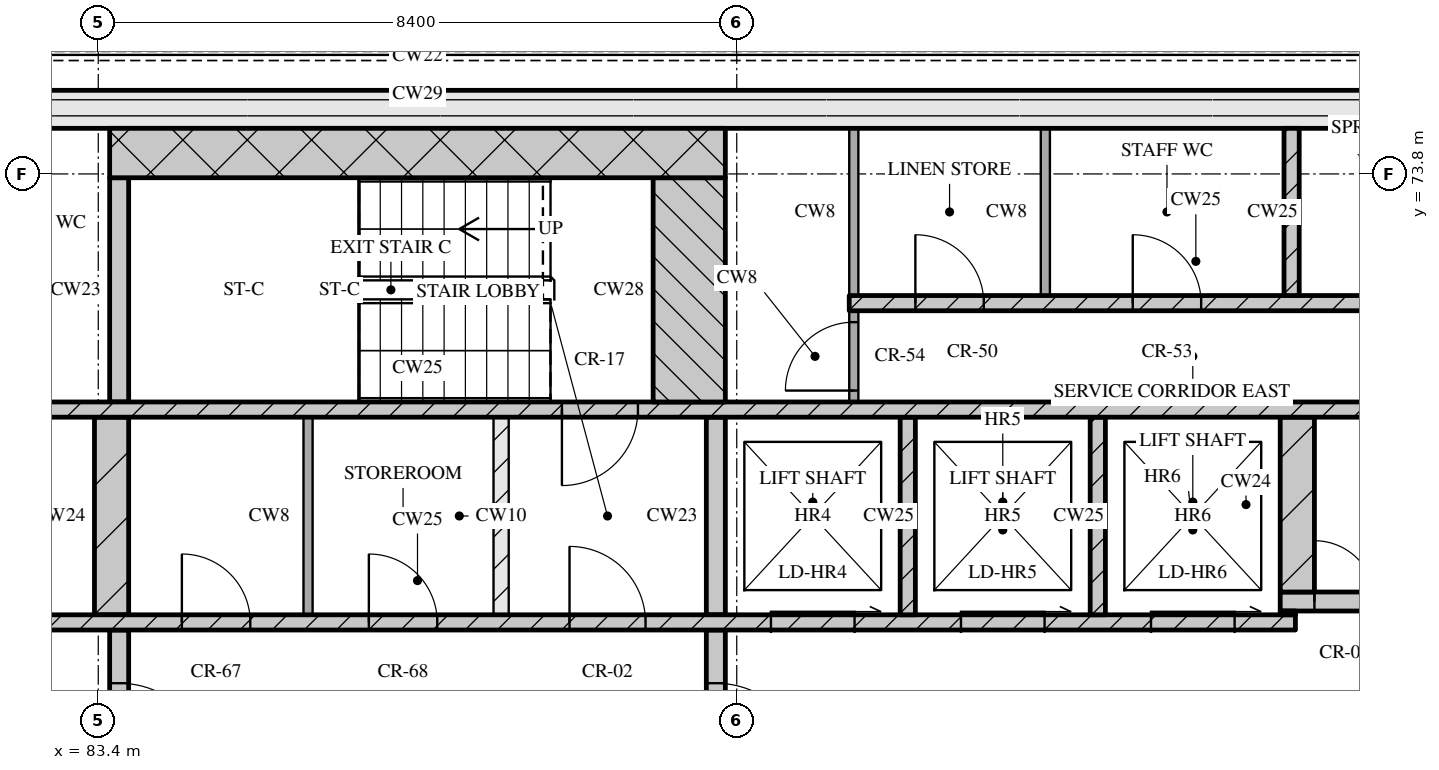
"""IFC4 building model, lengths in metres.
Left out: names, types, materials, properties, quantities, classifications, styles, units other than length and angle.
Written with IfcOpenShell. Run it as: python <this file> out.ifc"""

import sys

from ifc_helpers import new_model, si_unit, direction, frame, frame_2d, origin, place, context, subcontext, project, spatial, rectangle, extrude, element, fill, save


model = new_model("IFC4")
c1 = context("Model", 3, precision=1e-05, world=origin(), true_north=direction((0.0, 1.0)))
c2 = subcontext(c1, "Body", "Model", "MODEL_VIEW")
j1 = project(units=[si_unit("LENGTHUNIT", "METRE"), si_unit("PLANEANGLEUNIT", "RADIAN")], contexts=[c1])
p1 = place(None, origin())
s1 = spatial("IfcSite", under=j1, at=p1, CompositionType="ELEMENT")
p2 = place(p1, origin())
s2 = spatial("IfcBuilding", under=s1, at=p2, CompositionType="ELEMENT")
p3 = place(p2, frame((0.0, 0.0, 267.15)))
s3 = spatial("IfcBuildingStorey", under=s2, at=p3, CompositionType="ELEMENT", Elevation=267.15)
p4 = place(p3, frame((67.3, 74.65, 0.0), z_axis=(0.0, 0.0, 1.0), x_axis=(1.0, 0.0, 0.0)))
e1 = element("IfcWall", 1, at=p4, inside=s3, PredefinedType="SOLIDWALL", context=c2, shape_type="SweptSolid", body=[
    extrude(rectangle(XDim=40.6, YDim=0.5, at=frame_2d((20.3, 0.0))), origin(), (0.0, 0.0, 1.0), 3.32),
])
p5 = place(p3, frame((83.675, 65.2, 0.0), z_axis=(0.0, 0.0, 1.0), x_axis=(0.0, 1.0, 0.0)))
e2 = element("IfcWall", 2, at=p5, inside=s3, PredefinedType="SOLIDWALL", context=c2, shape_type="SweptSolid", body=[
    extrude(rectangle(XDim=2.6, YDim=0.25, at=frame_2d((1.3, 0.0))), origin(), (0.0, 0.0, 1.0), 3.32),
])
p6 = place(p5, frame((0.7, 0.0, 0.0)))
e3 = element("IfcOpeningElement", 3, at=p6, cuts=e2, PredefinedType="OPENING", context=c2, shape_type="SweptSolid", body=[
    extrude(rectangle(XDim=1.2, YDim=2.1, at=frame_2d((0.6, 1.05))), frame((0.0, 0.135, 0.0), z_axis=(0.0, -1.0, 0.0), x_axis=(1.0, 0.0, 0.0)), (0.0, 0.0, 1.0), 0.27),
])
p7 = place(p3, frame((91.525, 65.2, 0.0), z_axis=(0.0, 0.0, 1.0), x_axis=(0.0, 1.0, 0.0)))
e4 = element("IfcWall", 4, at=p7, inside=s3, PredefinedType="SOLIDWALL", context=c2, shape_type="SweptSolid", body=[
    extrude(rectangle(XDim=2.6, YDim=0.25, at=frame_2d((1.3, 0.0))), origin(), (0.0, 0.0, 1.0), 3.32),
])
p8 = place(p7, frame((0.7, 0.0, 0.0)))
e5 = element("IfcOpeningElement", 5, at=p8, cuts=e4, PredefinedType="OPENING", context=c2, shape_type="SweptSolid", body=[
    extrude(rectangle(XDim=1.2, YDim=2.1, at=frame_2d((0.6, 1.05))), frame((0.0, 0.135, 0.0), z_axis=(0.0, -1.0, 0.0), x_axis=(1.0, 0.0, 0.0)), (0.0, 0.0, 1.0), 0.27),
])
p9 = place(p3, frame((76.05, 67.9, 0.0), z_axis=(0.0, 0.0, 1.0), x_axis=(1.0, 0.0, 0.0)))
e6 = element("IfcWall", 6, at=p9, inside=s3, PredefinedType="SOLIDWALL", context=c2, shape_type="SweptSolid", body=[
    extrude(rectangle(XDim=23.1, YDim=0.2, at=frame_2d((11.55, 0.0))), origin(), (0.0, 0.0, 1.0), 3.32),
])
p10 = place(p9, frame((1.4, 0.0, 0.0)))
e7 = element("IfcOpeningElement", 7, at=p10, cuts=e6, PredefinedType="OPENING", context=c2, shape_type="SweptSolid", body=[
    extrude(rectangle(XDim=0.9, YDim=2.1, at=frame_2d((0.45, 1.05))), frame((0.0, 0.11, 0.0), z_axis=(0.0, -1.0, 0.0), x_axis=(1.0, 0.0, 0.0)), (0.0, 0.0, 1.0), 0.22),
])
p11 = place(p9, frame((5.11, 0.0, 0.0)))
e8 = element("IfcOpeningElement", 8, at=p11, cuts=e6, PredefinedType="OPENING", context=c2, shape_type="SweptSolid", body=[
    extrude(rectangle(XDim=0.9, YDim=2.1, at=frame_2d((0.45, 1.05))), frame((0.0, 0.11, 0.0), z_axis=(0.0, -1.0, 0.0), x_axis=(1.0, 0.0, 0.0)), (0.0, 0.0, 1.0), 0.22),
])
p12 = place(p9, frame((8.45, 0.0, 0.0)))
e9 = element("IfcOpeningElement", 9, at=p12, cuts=e6, PredefinedType="OPENING", context=c2, shape_type="SweptSolid", body=[
    extrude(rectangle(XDim=0.9, YDim=2.1, at=frame_2d((0.45, 1.05))), frame((0.0, 0.11, 0.0), z_axis=(0.0, -1.0, 0.0), x_axis=(1.0, 0.0, 0.0)), (0.0, 0.0, 1.0), 0.22),
])
p13 = place(p9, frame((10.91, 0.0, 0.0)))
e10 = element("IfcOpeningElement", 10, at=p13, cuts=e6, PredefinedType="OPENING", context=c2, shape_type="SweptSolid", body=[
    extrude(rectangle(XDim=0.9, YDim=2.1, at=frame_2d((0.45, 1.05))), frame((0.0, 0.11, 0.0), z_axis=(0.0, -1.0, 0.0), x_axis=(1.0, 0.0, 0.0)), (0.0, 0.0, 1.0), 0.22),
])
p14 = place(p9, frame((13.55, 0.0, 0.0)))
e11 = element("IfcOpeningElement", 11, at=p14, cuts=e6, PredefinedType="OPENING", context=c2, shape_type="SweptSolid", body=[
    extrude(rectangle(XDim=1.0, YDim=2.1, at=frame_2d((0.5, 1.05))), frame((0.0, 0.11, 0.0), z_axis=(0.0, -1.0, 0.0), x_axis=(1.0, 0.0, 0.0)), (0.0, 0.0, 1.0), 0.22),
])
p15 = place(p9, frame((16.2, 0.0, 0.0)))
e12 = element("IfcOpeningElement", 12, at=p15, cuts=e6, PredefinedType="OPENING", context=c2, shape_type="SweptSolid", body=[
    extrude(rectangle(XDim=1.1, YDim=2.1, at=frame_2d((0.55, 1.05))), frame((0.0, 0.11, 0.0), z_axis=(0.0, -1.0, 0.0), x_axis=(1.0, 0.0, 0.0)), (0.0, 0.0, 1.0), 0.22),
])
p16 = place(p9, frame((18.7, 0.0, 0.0)))
e13 = element("IfcOpeningElement", 13, at=p16, cuts=e6, PredefinedType="OPENING", context=c2, shape_type="SweptSolid", body=[
    extrude(rectangle(XDim=1.1, YDim=2.1, at=frame_2d((0.55, 1.05))), frame((0.0, 0.11, 0.0), z_axis=(0.0, -1.0, 0.0), x_axis=(1.0, 0.0, 0.0)), (0.0, 0.0, 1.0), 0.22),
])
p17 = place(p9, frame((21.2, 0.0, 0.0)))
e14 = element("IfcOpeningElement", 14, at=p17, cuts=e6, PredefinedType="OPENING", context=c2, shape_type="SweptSolid", body=[
    extrude(rectangle(XDim=1.1, YDim=2.1, at=frame_2d((0.55, 1.05))), frame((0.0, 0.11, 0.0), z_axis=(0.0, -1.0, 0.0), x_axis=(1.0, 0.0, 0.0)), (0.0, 0.0, 1.0), 0.22),
])
p18 = place(p3, frame((83.575, 68.0, 0.0), z_axis=(0.0, 0.0, 1.0), x_axis=(0.0, 1.0, 0.0)))
e15 = element("IfcWall", 15, at=p18, inside=s3, PredefinedType="SOLIDWALL", context=c2, shape_type="SweptSolid", body=[
    extrude(rectangle(XDim=2.6, YDim=0.45, at=frame_2d((1.3, 0.0))), origin(), (0.0, 0.0, 1.0), 3.32),
])
p19 = place(p3, frame((86.16, 68.0, 0.0), z_axis=(0.0, 0.0, 1.0), x_axis=(0.0, 1.0, 0.0)))
e16 = element("IfcWall", 16, at=p19, inside=s3, PredefinedType="PARTITIONING", context=c2, shape_type="SweptSolid", body=[
    extrude(rectangle(XDim=2.6, YDim=0.12, at=frame_2d((1.3, 0.0))), origin(), (0.0, 0.0, 1.0), 3.32),
])
p20 = place(p3, frame((88.7, 68.0, 0.0), z_axis=(0.0, 0.0, 1.0), x_axis=(0.0, 1.0, 0.0)))
e17 = element("IfcWall", 17, at=p20, inside=s3, PredefinedType="PARTITIONING", context=c2, shape_type="SweptSolid", body=[
    extrude(rectangle(XDim=2.6, YDim=0.2, at=frame_2d((1.3, 0.0))), origin(), (0.0, 0.0, 1.0), 3.32),
])
p21 = place(p3, frame((91.525, 68.0, 0.0), z_axis=(0.0, 0.0, 1.0), x_axis=(0.0, 1.0, 0.0)))
e18 = element("IfcWall", 18, at=p21, inside=s3, PredefinedType="SOLIDWALL", context=c2, shape_type="SweptSolid", body=[
    extrude(rectangle(XDim=2.6, YDim=0.25, at=frame_2d((1.3, 0.0))), origin(), (0.0, 0.0, 1.0), 3.32),
])
for number, where, z_axis, x_axis in (
    (19, (94.05, 68.0, 0.0), (0.0, 0.0, 1.0), (0.0, 1.0, 0.0)),
    (20, (96.55, 68.0, 0.0), (0.0, 0.0, 1.0), (0.0, 1.0, 0.0)),
):
    element("IfcWall", number, at=place(p3, frame(where, z_axis=z_axis, x_axis=x_axis)), inside=s3, PredefinedType="SOLIDWALL", context=c2, shape_type="SweptSolid", body=[
        extrude(rectangle(XDim=2.6, YDim=0.2, at=frame_2d((1.3, 0.0))), origin(), (0.0, 0.0, 1.0), 3.32),
    ])
p22 = place(p3, frame((98.95, 68.025, 0.0), z_axis=(0.0, 0.0, 1.0), x_axis=(1.0, 0.0, 0.0)))
e21 = element("IfcWall", 21, at=p22, inside=s3, PredefinedType="SOLIDWALL", context=c2, shape_type="SweptSolid", body=[
    extrude(rectangle(XDim=0.2, YDim=0.05, at=frame_2d((0.1, 0.0))), origin(), (0.0, 0.0, 1.0), 3.32),
])
p23 = place(p3, frame((98.95, 68.175, 0.0), z_axis=(0.0, 0.0, 1.0), x_axis=(1.0, 0.0, 0.0)))
e22 = element("IfcWall", 22, at=p23, inside=s3, PredefinedType="SOLIDWALL", context=c2, shape_type="SweptSolid", body=[
    extrude(rectangle(XDim=8.45, YDim=0.25, at=frame_2d((4.225, 0.0))), origin(), (0.0, 0.0, 1.0), 3.32),
])
p24 = place(p23, frame((0.45, 0.0, 0.0)))
e23 = element("IfcOpeningElement", 23, at=p24, cuts=e22, PredefinedType="OPENING", context=c2, shape_type="SweptSolid", body=[
    extrude(rectangle(XDim=0.8, YDim=2.1, at=frame_2d((0.4, 1.05))), frame((0.0, 0.135, 0.0), z_axis=(0.0, -1.0, 0.0), x_axis=(1.0, 0.0, 0.0)), (0.0, 0.0, 1.0), 0.27),
])
p25 = place(p23, frame((1.75, 0.0, 0.0)))
e24 = element("IfcOpeningElement", 24, at=p25, cuts=e22, PredefinedType="OPENING", context=c2, shape_type="SweptSolid", body=[
    extrude(rectangle(XDim=1.0, YDim=2.1, at=frame_2d((0.5, 1.05))), frame((0.0, 0.135, 0.0), z_axis=(0.0, -1.0, 0.0), x_axis=(1.0, 0.0, 0.0)), (0.0, 0.0, 1.0), 0.27),
])
p26 = place(p3, frame((99.175, 68.3, 0.0), z_axis=(0.0, 0.0, 1.0), x_axis=(0.0, 1.0, 0.0)))
e25 = element("IfcWall", 25, at=p26, inside=s3, PredefinedType="SOLIDWALL", context=c2, shape_type="SweptSolid", body=[
    extrude(rectangle(XDim=2.3, YDim=0.45, at=frame_2d((1.15, 0.0))), origin(), (0.0, 0.0, 1.0), 3.32),
])
p27 = place(p3, frame((67.8, 70.7, 0.0), z_axis=(0.0, 0.0, 1.0), x_axis=(1.0, 0.0, 0.0)))
e26 = element("IfcWall", 26, at=p27, inside=s3, PredefinedType="SOLIDWALL", context=c2, shape_type="SweptSolid", body=[
    extrude(rectangle(XDim=39.6, YDim=0.2, at=frame_2d((19.8, 0.0))), origin(), (0.0, 0.0, 1.0), 3.32),
])
p28 = place(p27, frame((0.65, 0.0, 0.0)))
e27 = element("IfcOpeningElement", 27, at=p28, cuts=e26, PredefinedType="OPENING", context=c2, shape_type="SweptSolid", body=[
    extrude(rectangle(XDim=1.1, YDim=2.1, at=frame_2d((0.55, 1.05))), frame((0.0, 0.11, 0.0), z_axis=(0.0, -1.0, 0.0), x_axis=(1.0, 0.0, 0.0)), (0.0, 0.0, 1.0), 0.22),
])
p29 = place(p27, frame((3.25, 0.0, 0.0)))
e28 = element("IfcOpeningElement", 28, at=p29, cuts=e26, PredefinedType="OPENING", context=c2, shape_type="SweptSolid", body=[
    extrude(rectangle(XDim=1.1, YDim=2.1, at=frame_2d((0.55, 1.05))), frame((0.0, 0.11, 0.0), z_axis=(0.0, -1.0, 0.0), x_axis=(1.0, 0.0, 0.0)), (0.0, 0.0, 1.0), 0.22),
])
p30 = place(p27, frame((5.9, 0.0, 0.0)))
e29 = element("IfcOpeningElement", 29, at=p30, cuts=e26, PredefinedType="OPENING", context=c2, shape_type="SweptSolid", body=[
    extrude(rectangle(XDim=1.0, YDim=2.1, at=frame_2d((0.5, 1.05))), frame((0.0, 0.11, 0.0), z_axis=(0.0, -1.0, 0.0), x_axis=(1.0, 0.0, 0.0)), (0.0, 0.0, 1.0), 0.22),
])
p31 = place(p27, frame((21.7, 0.0, 0.0)))
e30 = element("IfcOpeningElement", 30, at=p31, cuts=e26, PredefinedType="OPENING", context=c2, shape_type="SweptSolid", body=[
    extrude(rectangle(XDim=1.0, YDim=2.1, at=frame_2d((0.5, 1.05))), frame((0.0, 0.11, 0.0), z_axis=(0.0, -1.0, 0.0), x_axis=(1.0, 0.0, 0.0)), (0.0, 0.0, 1.0), 0.22),
])
p32 = place(p27, frame((32.7, 0.0, 0.0)))
e31 = element("IfcOpeningElement", 31, at=p32, cuts=e26, PredefinedType="OPENING", context=c2, shape_type="SweptSolid", body=[
    extrude(rectangle(XDim=1.0, YDim=2.1, at=frame_2d((0.5, 1.05))), frame((0.0, 0.11, 0.0), z_axis=(0.0, -1.0, 0.0), x_axis=(1.0, 0.0, 0.0)), (0.0, 0.0, 1.0), 0.22),
])
p33 = place(p27, frame((35.25, 0.0, 0.0)))
e32 = element("IfcOpeningElement", 32, at=p33, cuts=e26, PredefinedType="OPENING", context=c2, shape_type="SweptSolid", body=[
    extrude(rectangle(XDim=1.1, YDim=2.1, at=frame_2d((0.55, 1.05))), frame((0.0, 0.11, 0.0), z_axis=(0.0, -1.0, 0.0), x_axis=(1.0, 0.0, 0.0)), (0.0, 0.0, 1.0), 0.22),
])
p34 = place(p27, frame((37.85, 0.0, 0.0)))
e33 = element("IfcOpeningElement", 33, at=p34, cuts=e26, PredefinedType="OPENING", context=c2, shape_type="SweptSolid", body=[
    extrude(rectangle(XDim=1.1, YDim=2.1, at=frame_2d((0.55, 1.05))), frame((0.0, 0.11, 0.0), z_axis=(0.0, -1.0, 0.0), x_axis=(1.0, 0.0, 0.0)), (0.0, 0.0, 1.0), 0.22),
])
p35 = place(p3, frame((83.675, 70.8, 0.0), z_axis=(0.0, 0.0, 1.0), x_axis=(0.0, 1.0, 0.0)))
e34 = element("IfcWall", 34, at=p35, inside=s3, PredefinedType="SOLIDWALL", context=c2, shape_type="SweptSolid", body=[
    extrude(rectangle(XDim=2.95, YDim=0.25, at=frame_2d((1.475, 0.0))), origin(), (0.0, 0.0, 1.0), 3.32),
])
p36 = place(p3, frame((91.175, 70.8, 0.0), z_axis=(0.0, 0.0, 1.0), x_axis=(0.0, 1.0, 0.0)))
e35 = element("IfcWall", 35, at=p36, inside=s3, PredefinedType="SOLIDWALL", context=c2, shape_type="SweptSolid", body=[
    extrude(rectangle(XDim=2.95, YDim=0.95, at=frame_2d((1.475, 0.0))), origin(), (0.0, 0.0, 1.0), 3.32),
])
p37 = place(p3, frame((93.34, 70.8, 0.0), z_axis=(0.0, 0.0, 1.0), x_axis=(0.0, 1.0, 0.0)))
e36 = element("IfcWall", 36, at=p37, inside=s3, PredefinedType="PARTITIONING", context=c2, shape_type="SweptSolid", body=[
    extrude(rectangle(XDim=1.2, YDim=0.12, at=frame_2d((0.6, 0.0))), origin(), (0.0, 0.0, 1.0), 3.32),
])
p38 = place(p37, frame((0.15, 0.0, 0.0)))
e37 = element("IfcOpeningElement", 37, at=p38, cuts=e36, PredefinedType="OPENING", context=c2, shape_type="SweptSolid", body=[
    extrude(rectangle(XDim=0.9, YDim=2.1, at=frame_2d((0.45, 1.05))), frame((0.0, 0.07, 0.0), z_axis=(0.0, -1.0, 0.0), x_axis=(1.0, 0.0, 0.0)), (0.0, 0.0, 1.0), 0.14),
])
p39 = place(p3, frame((93.28, 72.1, 0.0), z_axis=(0.0, 0.0, 1.0), x_axis=(1.0, 0.0, 0.0)))
e38 = element("IfcWall", 38, at=p39, inside=s3, PredefinedType="SOLIDWALL", context=c2, shape_type="SweptSolid", body=[
    extrude(rectangle(XDim=9.12, YDim=0.2, at=frame_2d((4.56, 0.0))), origin(), (0.0, 0.0, 1.0), 3.32),
])
p40 = place(p39, frame((0.87, 0.0, 0.0)))
e39 = element("IfcOpeningElement", 39, at=p40, cuts=e38, PredefinedType="OPENING", context=c2, shape_type="SweptSolid", body=[
    extrude(rectangle(XDim=0.9, YDim=2.1, at=frame_2d((0.45, 1.05))), frame((0.0, 0.11, 0.0), z_axis=(0.0, -1.0, 0.0), x_axis=(1.0, 0.0, 0.0)), (0.0, 0.0, 1.0), 0.22),
])
p41 = place(p39, frame((3.73, 0.0, 0.0)))
e40 = element("IfcOpeningElement", 40, at=p41, cuts=e38, PredefinedType="OPENING", context=c2, shape_type="SweptSolid", body=[
    extrude(rectangle(XDim=0.9, YDim=2.1, at=frame_2d((0.45, 1.05))), frame((0.0, 0.11, 0.0), z_axis=(0.0, -1.0, 0.0), x_axis=(1.0, 0.0, 0.0)), (0.0, 0.0, 1.0), 0.22),
])
p42 = place(p39, frame((6.97, 0.0, 0.0)))
e41 = element("IfcOpeningElement", 41, at=p42, cuts=e38, PredefinedType="OPENING", context=c2, shape_type="SweptSolid", body=[
    extrude(rectangle(XDim=0.9, YDim=2.1, at=frame_2d((0.45, 1.05))), frame((0.0, 0.11, 0.0), z_axis=(0.0, -1.0, 0.0), x_axis=(1.0, 0.0, 0.0)), (0.0, 0.0, 1.0), 0.22),
])
for number, where, z_axis, x_axis in (
    (42, (93.34, 72.2, 0.0), (0.0, 0.0, 1.0), (0.0, 1.0, 0.0)),
    (43, (95.86, 72.2, 0.0), (0.0, 0.0, 1.0), (0.0, 1.0, 0.0)),
):
    element("IfcWall", number, at=place(p3, frame(where, z_axis=z_axis, x_axis=x_axis)), inside=s3, PredefinedType="PARTITIONING", context=c2, shape_type="SweptSolid", body=[
        extrude(rectangle(XDim=2.2, YDim=0.12, at=frame_2d((1.1, 0.0))), origin(), (0.0, 0.0, 1.0), 3.32),
    ])
p43 = place(p3, frame((99.1, 72.2, 0.0), z_axis=(0.0, 0.0, 1.0), x_axis=(0.0, 1.0, 0.0)))
e44 = element("IfcWall", 44, at=p43, inside=s3, PredefinedType="SOLIDWALL", context=c2, shape_type="SweptSolid", body=[
    extrude(rectangle(XDim=2.2, YDim=0.2, at=frame_2d((1.1, 0.0))), origin(), (0.0, 0.0, 1.0), 3.32),
])
p44 = place(p3, frame((83.55, 74.075, 0.0), z_axis=(0.0, 0.0, 1.0), x_axis=(1.0, 0.0, 0.0)))
e45 = element("IfcWall", 45, at=p44, inside=s3, PredefinedType="SOLIDWALL", context=c2, shape_type="SweptSolid", body=[
    extrude(rectangle(XDim=8.1, YDim=0.65, at=frame_2d((4.05, 0.0))), origin(), (0.0, 0.0, 1.0), 3.32),
])
p45 = place(p6, origin())
e46 = element("IfcDoor", 46, at=p45, inside=s3, OperationType="SINGLE_SWING_RIGHT", PredefinedType="DOOR", context=c2, shape_type="SweptSolid", body=[
    extrude(rectangle(XDim=1.2, YDim=2.1, at=frame_2d((0.6, 1.05))), frame((0.0, 0.025, 0.0), z_axis=(0.0, -1.0, 0.0), x_axis=(1.0, 0.0, 0.0)), (0.0, 0.0, 1.0), 0.05),
])
fill(e3, e46)
p46 = place(p8, origin())
e47 = element("IfcDoor", 47, at=p46, inside=s3, OperationType="SINGLE_SWING_RIGHT", PredefinedType="DOOR", context=c2, shape_type="SweptSolid", body=[
    extrude(rectangle(XDim=1.2, YDim=2.1, at=frame_2d((0.6, 1.05))), frame((0.0, 0.025, 0.0), z_axis=(0.0, -1.0, 0.0), x_axis=(1.0, 0.0, 0.0)), (0.0, 0.0, 1.0), 0.05),
])
fill(e5, e47)
p47 = place(p12, origin())
e48 = element("IfcDoor", 48, at=p47, inside=s3, OperationType="SINGLE_SWING_LEFT", PredefinedType="DOOR", context=c2, shape_type="SweptSolid", body=[
    extrude(rectangle(XDim=0.9, YDim=2.1, at=frame_2d((0.45, 1.05))), frame((0.0, 0.025, 0.0), z_axis=(0.0, -1.0, 0.0), x_axis=(1.0, 0.0, 0.0)), (0.0, 0.0, 1.0), 0.05),
])
fill(e9, e48)
p48 = place(p13, origin())
e49 = element("IfcDoor", 49, at=p48, inside=s3, OperationType="SINGLE_SWING_LEFT", PredefinedType="DOOR", context=c2, shape_type="SweptSolid", body=[
    extrude(rectangle(XDim=0.9, YDim=2.1, at=frame_2d((0.45, 1.05))), frame((0.0, 0.025, 0.0), z_axis=(0.0, -1.0, 0.0), x_axis=(1.0, 0.0, 0.0)), (0.0, 0.0, 1.0), 0.05),
])
fill(e10, e49)
p49 = place(p14, origin())
e50 = element("IfcDoor", 50, at=p49, inside=s3, OperationType="SINGLE_SWING_LEFT", PredefinedType="DOOR", context=c2, shape_type="SweptSolid", body=[
    extrude(rectangle(XDim=1.0, YDim=2.1, at=frame_2d((0.5, 1.05))), frame((0.0, 0.025, 0.0), z_axis=(0.0, -1.0, 0.0), x_axis=(1.0, 0.0, 0.0)), (0.0, 0.0, 1.0), 0.05),
])
fill(e11, e50)
p50 = place(p15, origin())
e51 = element("IfcDoor", 51, at=p50, inside=s3, OperationType="SLIDING_TO_RIGHT", PredefinedType="DOOR", context=c2, shape_type="SweptSolid", body=[
    extrude(rectangle(XDim=1.1, YDim=2.1, at=frame_2d((0.55, 1.05))), frame((0.0, 0.025, 0.0), z_axis=(0.0, -1.0, 0.0), x_axis=(1.0, 0.0, 0.0)), (0.0, 0.0, 1.0), 0.05),
])
fill(e12, e51)
p51 = place(p16, origin())
e52 = element("IfcDoor", 52, at=p51, inside=s3, OperationType="SLIDING_TO_RIGHT", PredefinedType="DOOR", context=c2, shape_type="SweptSolid", body=[
    extrude(rectangle(XDim=1.1, YDim=2.1, at=frame_2d((0.55, 1.05))), frame((0.0, 0.025, 0.0), z_axis=(0.0, -1.0, 0.0), x_axis=(1.0, 0.0, 0.0)), (0.0, 0.0, 1.0), 0.05),
])
fill(e13, e52)
p52 = place(p17, origin())
e53 = element("IfcDoor", 53, at=p52, inside=s3, OperationType="SLIDING_TO_RIGHT", PredefinedType="DOOR", context=c2, shape_type="SweptSolid", body=[
    extrude(rectangle(XDim=1.1, YDim=2.1, at=frame_2d((0.55, 1.05))), frame((0.0, 0.025, 0.0), z_axis=(0.0, -1.0, 0.0), x_axis=(1.0, 0.0, 0.0)), (0.0, 0.0, 1.0), 0.05),
])
fill(e14, e53)
p53 = place(p24, origin())
e54 = element("IfcDoor", 54, at=p53, inside=s3, OperationType="SINGLE_SWING_LEFT", PredefinedType="DOOR", context=c2, shape_type="SweptSolid", body=[
    extrude(rectangle(XDim=0.8, YDim=2.1, at=frame_2d((0.4, 1.05))), frame((0.0, 0.025, 0.0), z_axis=(0.0, -1.0, 0.0), x_axis=(1.0, 0.0, 0.0)), (0.0, 0.0, 1.0), 0.05),
])
fill(e23, e54)
p54 = place(p31, origin())
e55 = element("IfcDoor", 55, at=p54, inside=s3, OperationType="SINGLE_SWING_RIGHT", PredefinedType="DOOR", context=c2, shape_type="SweptSolid", body=[
    extrude(rectangle(XDim=1.0, YDim=2.1, at=frame_2d((0.5, 1.05))), frame((0.0, 0.025, 0.0), z_axis=(0.0, -1.0, 0.0), x_axis=(1.0, 0.0, 0.0)), (0.0, 0.0, 1.0), 0.05),
])
fill(e30, e55)
p55 = place(p38, origin())
e56 = element("IfcDoor", 56, at=p55, inside=s3, OperationType="SINGLE_SWING_LEFT", PredefinedType="DOOR", context=c2, shape_type="SweptSolid", body=[
    extrude(rectangle(XDim=0.9, YDim=2.1, at=frame_2d((0.45, 1.05))), frame((0.0, 0.025, 0.0), z_axis=(0.0, -1.0, 0.0), x_axis=(1.0, 0.0, 0.0)), (0.0, 0.0, 1.0), 0.05),
])
fill(e37, e56)
p56 = place(p40, origin())
e57 = element("IfcDoor", 57, at=p56, inside=s3, OperationType="SINGLE_SWING_LEFT", PredefinedType="DOOR", context=c2, shape_type="SweptSolid", body=[
    extrude(rectangle(XDim=0.9, YDim=2.1, at=frame_2d((0.45, 1.05))), frame((0.0, 0.025, 0.0), z_axis=(0.0, -1.0, 0.0), x_axis=(1.0, 0.0, 0.0)), (0.0, 0.0, 1.0), 0.05),
])
fill(e39, e57)
p57 = place(p41, origin())
e58 = element("IfcDoor", 58, at=p57, inside=s3, OperationType="SINGLE_SWING_LEFT", PredefinedType="DOOR", context=c2, shape_type="SweptSolid", body=[
    extrude(rectangle(XDim=0.9, YDim=2.1, at=frame_2d((0.45, 1.05))), frame((0.0, 0.025, 0.0), z_axis=(0.0, -1.0, 0.0), x_axis=(1.0, 0.0, 0.0)), (0.0, 0.0, 1.0), 0.05),
])
fill(e40, e58)
save(model, sys.argv[1])
